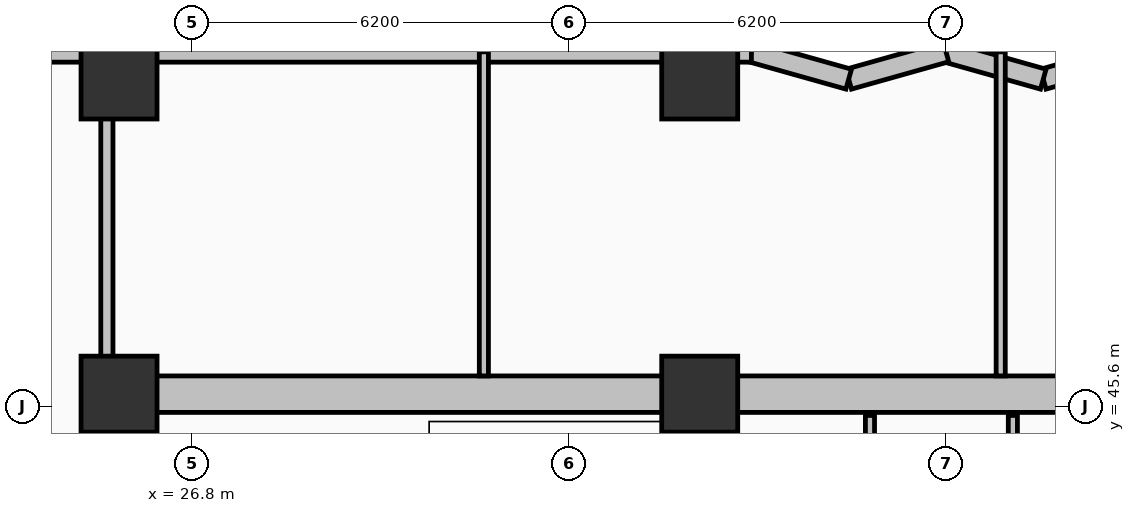
"""IFC4 building model, lengths in metres.
Left out: names, types, materials, properties, quantities, classifications, styles, units other than length and angle.
Written with IfcOpenShell. Run it as: python <this file> out.ifc"""

import sys

from ifc_helpers import new_model, si_unit, direction, frame, frame_2d, origin, origin_2d, place, context, subcontext, project, spatial, rectangle, extrude, element, fill, save


model = new_model("IFC4")
c1 = context("Model", 3, precision=1e-05, world=origin(), true_north=direction((0.0, 1.0)))
c2 = subcontext(c1, "Body", "Model", "MODEL_VIEW")
j1 = project(units=[si_unit("LENGTHUNIT", "METRE"), si_unit("PLANEANGLEUNIT", "RADIAN")], contexts=[c1])
p1 = place(None, origin())
s1 = spatial("IfcSite", under=j1, at=p1, CompositionType="ELEMENT")
p2 = place(p1, origin())
s2 = spatial("IfcBuilding", under=s1, at=p2, CompositionType="ELEMENT")
p3 = place(p2, frame((0.0, 0.0, 36.2)))
s3 = spatial("IfcBuildingStorey", under=s2, at=p3, CompositionType="ELEMENT", Elevation=36.2)
p4 = place(p3, frame((25.6, 45.8, 0.0), z_axis=(0.0, 0.0, 1.0), x_axis=(1.0, 0.0, 0.0)))
e1 = element("IfcWall", 1, at=p4, inside=s3, PredefinedType="SHEAR", context=c2, shape_type="SweptSolid", body=[
    extrude(rectangle(XDim=27.2, YDim=0.6, at=frame_2d((13.6, 0.0))), origin(), (0.0, 0.0, 1.0), 3.7),
])
p5 = place(p3, frame((25.6, 39.9, 0.0), z_axis=(0.0, 0.0, 1.0), x_axis=(0.0, 1.0, 0.0)))
e2 = element("IfcWall", 2, at=p5, inside=s3, PredefinedType="SHEAR", context=c2, shape_type="SweptSolid", body=[
    extrude(rectangle(XDim=5.6, YDim=0.6, at=frame_2d((2.8, 0.0))), origin(), (0.0, 0.0, 1.0), 3.7),
])
p6 = place(p3, frame((35.15, 39.9, 0.0), z_axis=(0.0, 0.0, 1.0), x_axis=(0.0, 1.0, 0.0)))
e3 = element("IfcWall", 3, at=p6, inside=s3, PredefinedType="SHEAR", context=c2, shape_type="SweptSolid", body=[
    extrude(rectangle(XDim=5.6, YDim=0.4, at=frame_2d((2.8, 0.0))), origin(), (0.0, 0.0, 1.0), 3.7),
])
for number, where, z_axis, x_axis in (
    (4, (25.6, 45.8, 0.0), (0.0, 0.0, 1.0), (1.0, 0.0, 0.0)),
    (5, (35.15, 45.8, 0.0), (0.0, 0.0, 1.0), (1.0, 0.0, 0.0)),
    (6, (25.6, 50.95, 0.0), (0.0, 0.0, 1.0), (1.0, 0.0, 0.0)),
    (7, (35.15, 50.95, 0.0), (0.0, 0.0, 1.0), (1.0, 0.0, 0.0)),
):
    element("IfcColumn", number, at=place(p3, frame(where, z_axis=z_axis, x_axis=x_axis)), inside=s3, PredefinedType="COLUMN", context=c2, shape_type="SweptSolid", body=[
        extrude(rectangle(XDim=1.25, YDim=1.25, at=origin_2d()), origin(), (0.0, 0.0, 1.0), 3.7),
    ])
p7 = place(p3, frame((42.4, 51.43, 0.0), z_axis=(0.0, 0.0, 1.0), x_axis=(-0.962652136636, -0.270741322725, 0.0)))
e8 = element("IfcWall", 8, at=p7, inside=s3, PredefinedType="SOLIDWALL", context=c2, shape_type="SweptSolid", body=[
    extrude(rectangle(XDim=1.662, YDim=0.34, at=frame_2d((0.831, 0.0))), origin(), (0.0, 0.0, 1.0), 2.7),
])
p8 = place(p3, frame((40.8, 50.98, 0.0), z_axis=(0.0, 0.0, 1.0), x_axis=(-0.962662902433, 0.270703040766, 0.0)))
e9 = element("IfcWall", 9, at=p8, inside=s3, PredefinedType="SOLIDWALL", context=c2, shape_type="SweptSolid", body=[
    extrude(rectangle(XDim=1.662, YDim=0.34, at=frame_2d((0.831, 0.0))), origin(), (0.0, 0.0, 1.0), 2.7),
])
p9 = place(p3, frame((39.2, 51.43, 0.0), z_axis=(0.0, 0.0, 1.0), x_axis=(-0.962652136636, -0.270741322725, 0.0)))
e10 = element("IfcWall", 10, at=p9, inside=s3, PredefinedType="SOLIDWALL", context=c2, shape_type="SweptSolid", body=[
    extrude(rectangle(XDim=1.662, YDim=0.34, at=frame_2d((0.831, 0.0))), origin(), (0.0, 0.0, 1.0), 2.7),
])
p10 = place(p3, frame((37.6, 50.98, 0.0), z_axis=(0.0, 0.0, 1.0), x_axis=(-0.962662902433, 0.270703040766, 0.0)))
e11 = element("IfcWall", 11, at=p10, inside=s3, PredefinedType="SOLIDWALL", context=c2, shape_type="SweptSolid", body=[
    extrude(rectangle(XDim=1.662, YDim=0.34, at=frame_2d((0.831, 0.0))), origin(), (0.0, 0.0, 1.0), 2.7),
])
p11 = place(p3, frame((36.0, 51.43, 0.0), z_axis=(0.0, 0.0, 1.0), x_axis=(-1.0, 0.0, 0.0)))
e12 = element("IfcWall", 12, at=p11, inside=s3, PredefinedType="SOLIDWALL", context=c2, shape_type="SweptSolid", body=[
    extrude(rectangle(XDim=17.4, YDim=0.34, at=frame_2d((8.7, 0.0))), origin(), (0.0, 0.0, 1.0), 2.7),
])
p12 = place(p11, frame((2.16, 0.0, 0.68)))
e13 = element("IfcOpeningElement", 13, at=p12, cuts=e12, PredefinedType="OPENING", context=c2, shape_type="SweptSolid", body=[
    extrude(rectangle(XDim=1.6, YDim=1.9, at=frame_2d((0.8, 0.95))), frame((0.0, 0.18, 0.0), z_axis=(0.0, -1.0, 0.0), x_axis=(1.0, 0.0, 0.0)), (0.0, 0.0, 1.0), 0.36),
])
p13 = place(p11, frame((5.03, 0.0, 0.68)))
e14 = element("IfcOpeningElement", 14, at=p13, cuts=e12, PredefinedType="OPENING", context=c2, shape_type="SweptSolid", body=[
    extrude(rectangle(XDim=1.6, YDim=1.9, at=frame_2d((0.8, 0.95))), frame((0.0, 0.18, 0.0), z_axis=(0.0, -1.0, 0.0), x_axis=(1.0, 0.0, 0.0)), (0.0, 0.0, 1.0), 0.36),
])
p14 = place(p11, frame((7.55, 0.0, 0.68)))
e15 = element("IfcOpeningElement", 15, at=p14, cuts=e12, PredefinedType="OPENING", context=c2, shape_type="SweptSolid", body=[
    extrude(rectangle(XDim=1.6, YDim=1.9, at=frame_2d((0.8, 0.95))), frame((0.0, 0.18, 0.0), z_axis=(0.0, -1.0, 0.0), x_axis=(1.0, 0.0, 0.0)), (0.0, 0.0, 1.0), 0.36),
])
p15 = place(p11, frame((14.34, 0.0, 0.68)))
e16 = element("IfcOpeningElement", 16, at=p15, cuts=e12, PredefinedType="OPENING", context=c2, shape_type="SweptSolid", body=[
    extrude(rectangle(XDim=1.6, YDim=1.9, at=frame_2d((0.8, 0.95))), frame((0.0, 0.18, 0.0), z_axis=(0.0, -1.0, 0.0), x_axis=(1.0, 0.0, 0.0)), (0.0, 0.0, 1.0), 0.36),
])
p16 = place(p3, frame((37.95, 42.6, 0.0), z_axis=(0.0, 0.0, 1.0), x_axis=(0.0, 1.0, 0.0)))
e17 = element("IfcWall", 17, at=p16, inside=s3, PredefinedType="PARTITIONING", context=c2, shape_type="SweptSolid", body=[
    extrude(rectangle(XDim=2.85, YDim=0.15, at=frame_2d((1.425, 0.0))), origin(), (0.0, 0.0, 1.0), 2.53),
])
p17 = place(p3, frame((40.3, 42.65, 0.0), z_axis=(0.0, 0.0, 1.0), x_axis=(0.0, 1.0, 0.0)))
e18 = element("IfcWall", 18, at=p17, inside=s3, PredefinedType="PARTITIONING", context=c2, shape_type="SweptSolid", body=[
    extrude(rectangle(XDim=2.8, YDim=0.15, at=frame_2d((1.4, 0.0))), origin(), (0.0, 0.0, 1.0), 2.53),
])
p18 = place(p3, frame((31.6, 46.1, 0.0), z_axis=(0.0, 0.0, 1.0), x_axis=(0.0, 1.0, 0.0)))
e19 = element("IfcWall", 19, at=p18, inside=s3, PredefinedType="PARTITIONING", context=c2, shape_type="SweptSolid", body=[
    extrude(rectangle(XDim=5.33, YDim=0.15, at=frame_2d((2.665, 0.0))), origin(), (0.0, 0.0, 1.0), 2.53),
])
p19 = place(p18, frame((0.85, 0.0, 0.0)))
e20 = element("IfcOpeningElement", 20, at=p19, cuts=e19, PredefinedType="OPENING", context=c2, shape_type="SweptSolid", body=[
    extrude(rectangle(XDim=0.9, YDim=2.1, at=frame_2d((0.45, 1.05))), frame((0.0, 0.085, 0.0), z_axis=(0.0, -1.0, 0.0), x_axis=(1.0, 0.0, 0.0)), (0.0, 0.0, 1.0), 0.17),
])
p20 = place(p3, frame((40.1, 46.1, 0.0), z_axis=(0.0, 0.0, 1.0), x_axis=(0.0, 1.0, 0.0)))
e21 = element("IfcWall", 21, at=p20, inside=s3, PredefinedType="PARTITIONING", context=c2, shape_type="SweptSolid", body=[
    extrude(rectangle(XDim=5.33, YDim=0.15, at=frame_2d((2.665, 0.0))), origin(), (0.0, 0.0, 1.0), 2.53),
])
p21 = place(p3, frame((25.4, 46.1, 0.0), z_axis=(0.0, 0.0, 1.0), x_axis=(0.0, 1.0, 0.0)))
e22 = element("IfcWall", 22, at=p21, inside=s3, PredefinedType="PARTITIONING", context=c2, shape_type="SweptSolid", body=[
    extrude(rectangle(XDim=4.38, YDim=0.2, at=frame_2d((2.19, 0.0))), origin(), (0.0, 0.0, 1.0), 2.53),
])
p22 = place(p21, frame((1.05, 0.0, 0.0)))
e23 = element("IfcOpeningElement", 23, at=p22, cuts=e22, PredefinedType="OPENING", context=c2, shape_type="SweptSolid", body=[
    extrude(rectangle(XDim=0.9, YDim=2.1, at=frame_2d((0.45, 1.05))), frame((0.0, 0.11, 0.0), z_axis=(0.0, -1.0, 0.0), x_axis=(1.0, 0.0, 0.0)), (0.0, 0.0, 1.0), 0.22),
])
p23 = place(p12, origin())
e24 = element("IfcWindow", 24, at=p23, inside=s3, PartitioningType="SINGLE_PANEL", PredefinedType="WINDOW", context=c2, shape_type="SweptSolid", body=[
    extrude(rectangle(XDim=1.6, YDim=1.9, at=frame_2d((0.8, 0.95))), frame((0.0, 0.03, 0.0), z_axis=(0.0, -1.0, 0.0), x_axis=(1.0, 0.0, 0.0)), (0.0, 0.0, 1.0), 0.06),
])
fill(e13, e24)
p24 = place(p13, origin())
e25 = element("IfcWindow", 25, at=p24, inside=s3, PartitioningType="SINGLE_PANEL", PredefinedType="WINDOW", context=c2, shape_type="SweptSolid", body=[
    extrude(rectangle(XDim=1.6, YDim=1.9, at=frame_2d((0.8, 0.95))), frame((0.0, 0.03, 0.0), z_axis=(0.0, -1.0, 0.0), x_axis=(1.0, 0.0, 0.0)), (0.0, 0.0, 1.0), 0.06),
])
fill(e14, e25)
p25 = place(p14, origin())
e26 = element("IfcWindow", 26, at=p25, inside=s3, PartitioningType="SINGLE_PANEL", PredefinedType="WINDOW", context=c2, shape_type="SweptSolid", body=[
    extrude(rectangle(XDim=1.6, YDim=1.9, at=frame_2d((0.8, 0.95))), frame((0.0, 0.03, 0.0), z_axis=(0.0, -1.0, 0.0), x_axis=(1.0, 0.0, 0.0)), (0.0, 0.0, 1.0), 0.06),
])
fill(e15, e26)
p26 = place(p19, origin())
e27 = element("IfcDoor", 27, at=p26, inside=s3, OperationType="SINGLE_SWING_RIGHT", PredefinedType="DOOR", context=c2, shape_type="SweptSolid", body=[
    extrude(rectangle(XDim=0.9, YDim=2.1, at=frame_2d((0.45, 1.05))), frame((0.0, 0.025, 0.0), z_axis=(0.0, -1.0, 0.0), x_axis=(1.0, 0.0, 0.0)), (0.0, 0.0, 1.0), 0.05),
])
fill(e20, e27)
p27 = place(p22, origin())
e28 = element("IfcDoor", 28, at=p27, inside=s3, OperationType="SINGLE_SWING_RIGHT", PredefinedType="DOOR", context=c2, shape_type="SweptSolid", body=[
    extrude(rectangle(XDim=0.9, YDim=2.1, at=frame_2d((0.45, 1.05))), frame((0.0, 0.025, 0.0), z_axis=(0.0, -1.0, 0.0), x_axis=(1.0, 0.0, 0.0)), (0.0, 0.0, 1.0), 0.05),
])
fill(e23, e28)
save(model, sys.argv[1])
